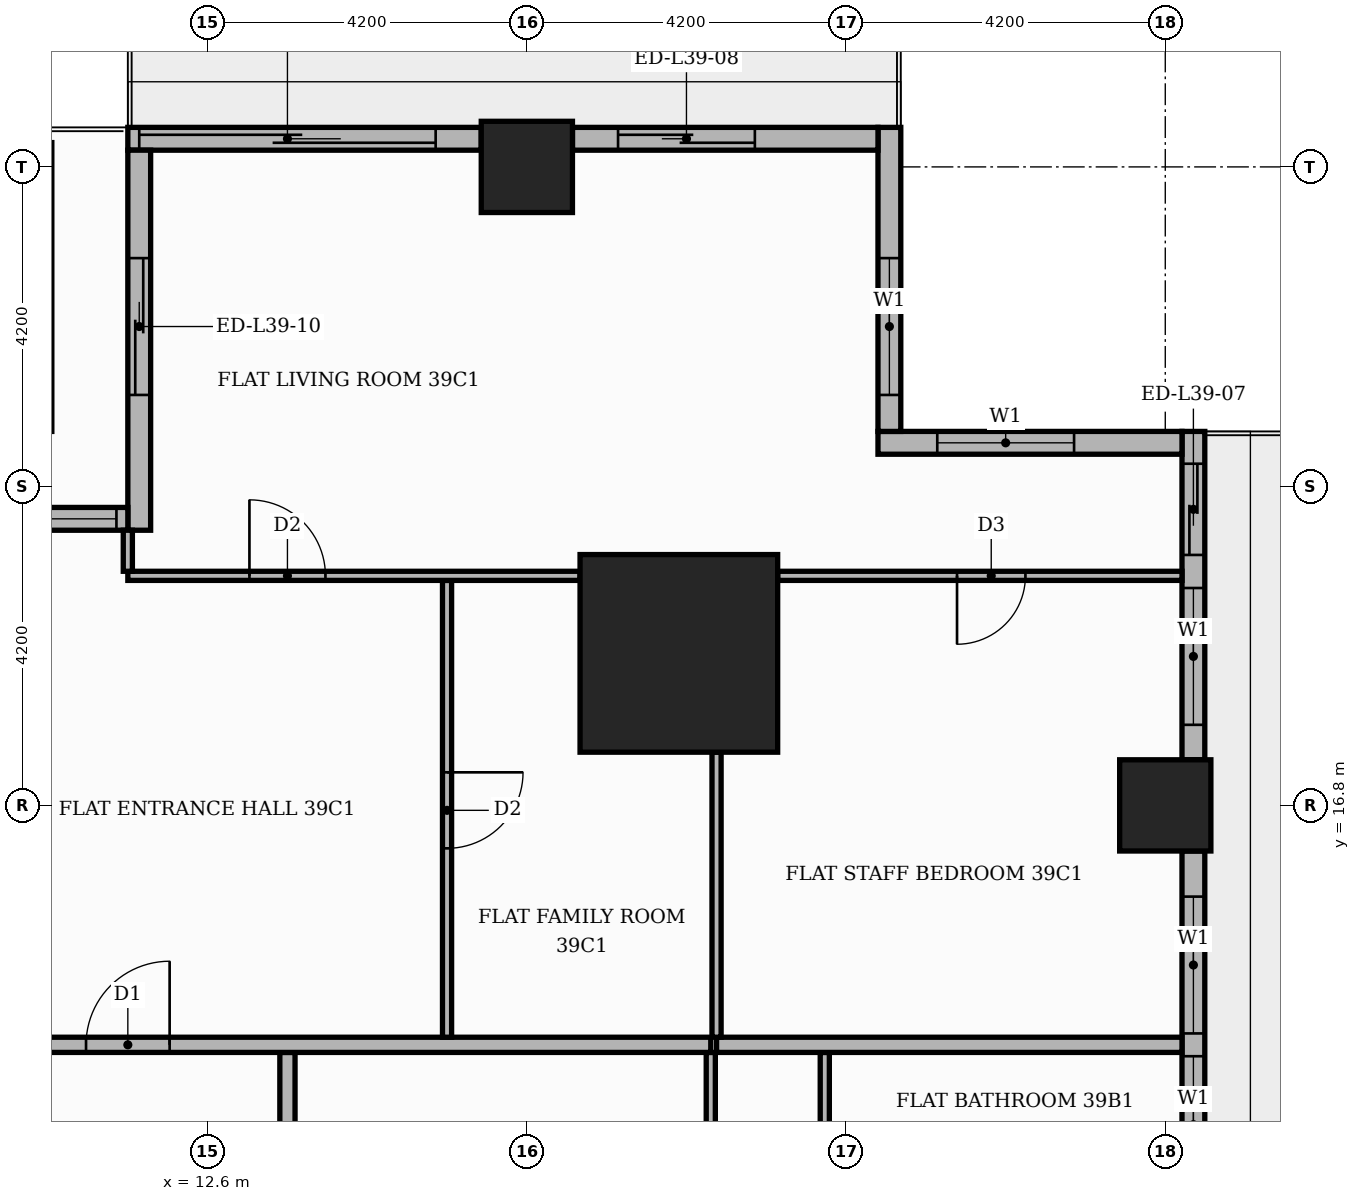
"""IFC4 building model, lengths in metres.
Left out: names, types, materials, properties, quantities, classifications, styles, units other than length and angle.
Written with IfcOpenShell. Run it as: python <this file> out.ifc"""

import sys

from ifc_helpers import new_model, si_unit, direction, frame, frame_2d, origin, origin_2d, place, context, subcontext, project, spatial, rectangle, extrude, element, fill, save


model = new_model("IFC4")
c1 = context("Model", 3, precision=1e-05, world=origin(), true_north=direction((0.0, 1.0)))
c2 = subcontext(c1, "Body", "Model", "MODEL_VIEW")
j1 = project(units=[si_unit("LENGTHUNIT", "METRE"), si_unit("PLANEANGLEUNIT", "RADIAN")], contexts=[c1])
p1 = place(None, origin())
s1 = spatial("IfcSite", under=j1, at=p1, CompositionType="ELEMENT")
p2 = place(p1, origin())
s2 = spatial("IfcBuilding", under=s1, at=p2, CompositionType="ELEMENT")
p3 = place(p2, frame((0.0, 0.0, 165.0)))
s3 = spatial("IfcBuildingStorey", under=s2, at=p3, CompositionType="ELEMENT", Elevation=165.0)
p4 = place(p3, frame((18.8, 18.8, 0.0), z_axis=(0.0, 0.0, 1.0), x_axis=(1.0, 0.0, 0.0)))
e1 = element("IfcColumn", 1, at=p4, inside=s3, PredefinedType="COLUMN", context=c2, shape_type="SweptSolid", body=[
    extrude(rectangle(XDim=2.6, YDim=2.6, at=origin_2d()), origin(), (0.0, 0.0, 1.0), 3.9),
])
for number, where, z_axis, x_axis in (
    (2, (25.2, 16.8, 0.0), (0.0, 0.0, 1.0), (1.0, 0.0, 0.0)),
    (3, (16.8, 25.2, 0.0), (0.0, 0.0, 1.0), (1.0, 0.0, 0.0)),
):
    element("IfcColumn", number, at=place(p3, frame(where, z_axis=z_axis, x_axis=x_axis)), inside=s3, PredefinedType="COLUMN", context=c2, shape_type="SweptSolid", body=[
        extrude(rectangle(XDim=1.2, YDim=1.2, at=origin_2d()), origin(), (0.0, 0.0, 1.0), 3.9),
    ])
p5 = place(p3, frame((25.57, 9.0, 0.0), z_axis=(0.0, 0.0, 1.0), x_axis=(0.0, 1.0, 0.0)))
e4 = element("IfcWall", 4, at=p5, inside=s3, PredefinedType="STANDARD", context=c2, shape_type="SweptSolid", body=[
    extrude(rectangle(XDim=7.2, YDim=0.3, at=frame_2d((3.6, 0.0))), origin(), (0.0, 0.0, 1.0), 3.48),
])
p6 = place(p5, frame((0.6, 0.0, 0.9)))
e5 = element("IfcOpeningElement", 5, at=p6, cuts=e4, PredefinedType="OPENING", context=c2, shape_type="SweptSolid", body=[
    extrude(rectangle(XDim=1.8, YDim=2.1, at=frame_2d((0.9, 1.05))), frame((0.0, 0.16, 0.0), z_axis=(0.0, -1.0, 0.0), x_axis=(1.0, 0.0, 0.0)), (0.0, 0.0, 1.0), 0.32),
])
p7 = place(p5, frame((2.7, 0.0, 0.9)))
e6 = element("IfcOpeningElement", 6, at=p7, cuts=e4, PredefinedType="OPENING", context=c2, shape_type="SweptSolid", body=[
    extrude(rectangle(XDim=1.8, YDim=2.1, at=frame_2d((0.9, 1.05))), frame((0.0, 0.16, 0.0), z_axis=(0.0, -1.0, 0.0), x_axis=(1.0, 0.0, 0.0)), (0.0, 0.0, 1.0), 0.32),
])
p8 = place(p5, frame((4.8, 0.0, 0.9)))
e7 = element("IfcOpeningElement", 7, at=p8, cuts=e4, PredefinedType="OPENING", context=c2, shape_type="SweptSolid", body=[
    extrude(rectangle(XDim=1.8, YDim=2.1, at=frame_2d((0.9, 1.05))), frame((0.0, 0.16, 0.0), z_axis=(0.0, -1.0, 0.0), x_axis=(1.0, 0.0, 0.0)), (0.0, 0.0, 1.0), 0.32),
])
p9 = place(p3, frame((25.57, 17.4, 0.0), z_axis=(0.0, 0.0, 1.0), x_axis=(0.0, 1.0, 0.0)))
e8 = element("IfcWall", 8, at=p9, inside=s3, PredefinedType="STANDARD", context=c2, shape_type="SweptSolid", body=[
    extrude(rectangle(XDim=4.32, YDim=0.3, at=frame_2d((2.16, 0.0))), origin(), (0.0, 0.0, 1.0), 3.48),
])
p10 = place(p9, frame((2.695, 0.0, 0.0)))
e9 = element("IfcOpeningElement", 9, at=p10, cuts=e8, PredefinedType="OPENING", context=c2, shape_type="SweptSolid", body=[
    extrude(rectangle(XDim=1.2, YDim=2.4, at=frame_2d((0.6, 1.2))), frame((0.0, 0.16, 0.0), z_axis=(0.0, -1.0, 0.0), x_axis=(1.0, 0.0, 0.0)), (0.0, 0.0, 1.0), 0.32),
])
p11 = place(p9, frame((0.46, 0.0, 0.9)))
e10 = element("IfcOpeningElement", 10, at=p11, cuts=e8, PredefinedType="OPENING", context=c2, shape_type="SweptSolid", body=[
    extrude(rectangle(XDim=1.8, YDim=2.1, at=frame_2d((0.9, 1.05))), frame((0.0, 0.16, 0.0), z_axis=(0.0, -1.0, 0.0), x_axis=(1.0, 0.0, 0.0)), (0.0, 0.0, 1.0), 0.32),
])
p12 = place(p3, frame((25.42, 21.57, 0.0), z_axis=(0.0, 0.0, 1.0), x_axis=(-1.0, 0.0, 0.0)))
e11 = element("IfcWall", 11, at=p12, inside=s3, PredefinedType="STANDARD", context=c2, shape_type="SweptSolid", body=[
    extrude(rectangle(XDim=4.0, YDim=0.3, at=frame_2d((2.0, 0.0))), origin(), (0.0, 0.0, 1.0), 3.48),
])
p13 = place(p12, frame((1.42, 0.0, 0.9)))
e12 = element("IfcOpeningElement", 12, at=p13, cuts=e11, PredefinedType="OPENING", context=c2, shape_type="SweptSolid", body=[
    extrude(rectangle(XDim=1.8, YDim=2.1, at=frame_2d((0.9, 1.05))), frame((0.0, 0.16, 0.0), z_axis=(0.0, -1.0, 0.0), x_axis=(1.0, 0.0, 0.0)), (0.0, 0.0, 1.0), 0.32),
])
p14 = place(p3, frame((21.57, 21.72, 0.0), z_axis=(0.0, 0.0, 1.0), x_axis=(0.0, 1.0, 0.0)))
e13 = element("IfcWall", 13, at=p14, inside=s3, PredefinedType="STANDARD", context=c2, shape_type="SweptSolid", body=[
    extrude(rectangle(XDim=4.0, YDim=0.3, at=frame_2d((2.0, 0.0))), origin(), (0.0, 0.0, 1.0), 3.48),
])
p15 = place(p14, frame((0.48, 0.0, 0.9)))
e14 = element("IfcOpeningElement", 14, at=p15, cuts=e13, PredefinedType="OPENING", context=c2, shape_type="SweptSolid", body=[
    extrude(rectangle(XDim=1.8, YDim=2.1, at=frame_2d((0.9, 1.05))), frame((0.0, 0.16, 0.0), z_axis=(0.0, -1.0, 0.0), x_axis=(1.0, 0.0, 0.0)), (0.0, 0.0, 1.0), 0.32),
])
p16 = place(p3, frame((21.42, 25.57, 0.0), z_axis=(0.0, 0.0, 1.0), x_axis=(-1.0, 0.0, 0.0)))
e15 = element("IfcWall", 15, at=p16, inside=s3, PredefinedType="STANDARD", context=c2, shape_type="SweptSolid", body=[
    extrude(rectangle(XDim=4.02, YDim=0.3, at=frame_2d((2.01, 0.0))), origin(), (0.0, 0.0, 1.0), 3.48),
])
p17 = place(p16, frame((1.62, 0.0, 0.0)))
e16 = element("IfcOpeningElement", 16, at=p17, cuts=e15, PredefinedType="OPENING", context=c2, shape_type="SweptSolid", body=[
    extrude(rectangle(XDim=1.8, YDim=2.4, at=frame_2d((0.9, 1.2))), frame((0.0, 0.16, 0.0), z_axis=(0.0, -1.0, 0.0), x_axis=(1.0, 0.0, 0.0)), (0.0, 0.0, 1.0), 0.32),
])
p18 = place(p3, frame((16.2, 25.57, 0.0), z_axis=(0.0, 0.0, 1.0), x_axis=(-1.0, 0.0, 0.0)))
e17 = element("IfcWall", 17, at=p18, inside=s3, PredefinedType="STANDARD", context=c2, shape_type="SweptSolid", body=[
    extrude(rectangle(XDim=4.65, YDim=0.3, at=frame_2d((2.325, 0.0))), origin(), (0.0, 0.0, 1.0), 3.48),
])
p19 = place(p18, frame((0.6, 0.0, 0.0)))
e18 = element("IfcOpeningElement", 18, at=p19, cuts=e17, PredefinedType="OPENING", context=c2, shape_type="SweptSolid", body=[
    extrude(rectangle(XDim=3.9, YDim=2.4, at=frame_2d((1.95, 1.2))), frame((0.0, 0.16, 0.0), z_axis=(0.0, -1.0, 0.0), x_axis=(1.0, 0.0, 0.0)), (0.0, 0.0, 1.0), 0.32),
])
p20 = place(p3, frame((11.7, 25.42, 0.0), z_axis=(0.0, 0.0, 1.0), x_axis=(0.0, -1.0, 0.0)))
e19 = element("IfcWall", 19, at=p20, inside=s3, PredefinedType="STANDARD", context=c2, shape_type="SweptSolid", body=[
    extrude(rectangle(XDim=5.0, YDim=0.3, at=frame_2d((2.5, 0.0))), origin(), (0.0, 0.0, 1.0), 3.48),
])
p21 = place(p20, frame((1.42, 0.0, 0.0)))
e20 = element("IfcOpeningElement", 20, at=p21, cuts=e19, PredefinedType="OPENING", context=c2, shape_type="SweptSolid", body=[
    extrude(rectangle(XDim=1.8, YDim=2.4, at=frame_2d((0.9, 1.2))), frame((0.0, 0.16, 0.0), z_axis=(0.0, -1.0, 0.0), x_axis=(1.0, 0.0, 0.0)), (0.0, 0.0, 1.0), 0.32),
])
p22 = place(p3, frame((11.55, 20.57, 0.0), z_axis=(0.0, 0.0, 1.0), x_axis=(-1.0, 0.0, 0.0)))
e21 = element("IfcWall", 21, at=p22, inside=s3, PredefinedType="STANDARD", context=c2, shape_type="SweptSolid", body=[
    extrude(rectangle(XDim=23.4, YDim=0.3, at=frame_2d((11.7, 0.0))), origin(), (0.0, 0.0, 1.0), 3.48),
])
p23 = place(p22, frame((0.15, 0.0, 0.9)))
e22 = element("IfcOpeningElement", 22, at=p23, cuts=e21, PredefinedType="OPENING", context=c2, shape_type="SweptSolid", body=[
    extrude(rectangle(XDim=6.0, YDim=2.1, at=frame_2d((3.0, 1.05))), frame((0.0, 0.16, 0.0), z_axis=(0.0, -1.0, 0.0), x_axis=(1.0, 0.0, 0.0)), (0.0, 0.0, 1.0), 0.32),
])
p24 = place(p22, frame((6.45, 0.0, 0.9)))
e23 = element("IfcOpeningElement", 23, at=p24, cuts=e21, PredefinedType="OPENING", context=c2, shape_type="SweptSolid", body=[
    extrude(rectangle(XDim=6.0, YDim=2.1, at=frame_2d((3.0, 1.05))), frame((0.0, 0.16, 0.0), z_axis=(0.0, -1.0, 0.0), x_axis=(1.0, 0.0, 0.0)), (0.0, 0.0, 1.0), 0.32),
])
p25 = place(p22, frame((12.75, 0.0, 0.9)))
e24 = element("IfcOpeningElement", 24, at=p25, cuts=e21, PredefinedType="OPENING", context=c2, shape_type="SweptSolid", body=[
    extrude(rectangle(XDim=6.0, YDim=2.1, at=frame_2d((3.0, 1.05))), frame((0.0, 0.16, 0.0), z_axis=(0.0, -1.0, 0.0), x_axis=(1.0, 0.0, 0.0)), (0.0, 0.0, 1.0), 0.32),
])
p26 = place(p22, frame((19.05, 0.0, 0.9)))
e25 = element("IfcOpeningElement", 25, at=p26, cuts=e21, PredefinedType="OPENING", context=c2, shape_type="SweptSolid", body=[
    extrude(rectangle(XDim=3.9, YDim=2.1, at=frame_2d((1.95, 1.05))), frame((0.0, 0.16, 0.0), z_axis=(0.0, -1.0, 0.0), x_axis=(1.0, 0.0, 0.0)), (0.0, 0.0, 1.0), 0.32),
])
p27 = place(p3, frame((19.22, 9.21, 0.0), z_axis=(0.0, 0.0, 1.0), x_axis=(0.0, 1.0, 0.0)))
e26 = element("IfcWall", 26, at=p27, inside=s3, PredefinedType="PARTITIONING", context=c2, shape_type="SweptSolid", body=[
    extrude(rectangle(XDim=4.34, YDim=0.12, at=frame_2d((2.17, 0.0))), origin(), (0.0, 0.0, 1.0), 3.48),
])
p28 = place(p27, frame((1.74, 0.0, 0.0)))
e27 = element("IfcOpeningElement", 27, at=p28, cuts=e26, PredefinedType="OPENING", context=c2, shape_type="SweptSolid", body=[
    extrude(rectangle(XDim=0.9, YDim=2.1, at=frame_2d((0.45, 1.05))), frame((0.0, 0.07, 0.0), z_axis=(0.0, -1.0, 0.0), x_axis=(1.0, 0.0, 0.0)), (0.0, 0.0, 1.0), 0.14),
])
p29 = place(p3, frame((13.65, 11.1, 0.0), z_axis=(0.0, 0.0, 1.0), x_axis=(0.0, 1.0, 0.0)))
e28 = element("IfcWall", 28, at=p29, inside=s3, PredefinedType="PARTITIONING", context=c2, shape_type="SweptSolid", body=[
    extrude(rectangle(XDim=2.45, YDim=0.2, at=frame_2d((1.225, 0.0))), origin(), (0.0, 0.0, 1.0), 3.48),
])
p30 = place(p3, frame((20.72, 11.61, 0.0), z_axis=(0.0, 0.0, 1.0), x_axis=(0.0, 1.0, 0.0)))
e29 = element("IfcWall", 29, at=p30, inside=s3, PredefinedType="PARTITIONING", context=c2, shape_type="SweptSolid", body=[
    extrude(rectangle(XDim=1.94, YDim=0.12, at=frame_2d((0.97, 0.0))), origin(), (0.0, 0.0, 1.0), 3.48),
])
p31 = place(p3, frame((-13.65, 13.65, 0.0), z_axis=(0.0, 0.0, 1.0), x_axis=(1.0, 0.0, 0.0)))
e30 = element("IfcWall", 30, at=p31, inside=s3, PredefinedType="PARTITIONING", context=c2, shape_type="SweptSolid", body=[
    extrude(rectangle(XDim=32.87, YDim=0.2, at=frame_2d((16.435, 0.0))), origin(), (0.0, 0.0, 1.0), 3.48),
])
p32 = place(p31, frame((24.65, 0.0, 0.0)))
e31 = element("IfcOpeningElement", 31, at=p32, cuts=e30, PredefinedType="OPENING", context=c2, shape_type="SweptSolid", body=[
    extrude(rectangle(XDim=1.1, YDim=2.4, at=frame_2d((0.55, 1.2))), frame((0.0, 0.11, 0.0), z_axis=(0.0, -1.0, 0.0), x_axis=(1.0, 0.0, 0.0)), (0.0, 0.0, 1.0), 0.22),
])
p33 = place(p31, frame((12.05, 0.0, 0.0)))
e32 = element("IfcOpeningElement", 32, at=p33, cuts=e30, PredefinedType="OPENING", context=c2, shape_type="SweptSolid", body=[
    extrude(rectangle(XDim=1.1, YDim=2.4, at=frame_2d((0.55, 1.2))), frame((0.0, 0.11, 0.0), z_axis=(0.0, -1.0, 0.0), x_axis=(1.0, 0.0, 0.0)), (0.0, 0.0, 1.0), 0.22),
])
p34 = place(p3, frame((19.296, 13.65, 0.0), z_axis=(0.0, 0.0, 1.0), x_axis=(1.0, 0.0, 0.0)))
e33 = element("IfcWall", 33, at=p34, inside=s3, PredefinedType="PARTITIONING", context=c2, shape_type="SweptSolid", body=[
    extrude(rectangle(XDim=6.124, YDim=0.2, at=frame_2d((3.062, 0.0))), origin(), (0.0, 0.0, 1.0), 3.48),
])
p35 = place(p3, frame((15.75, 13.75, 0.0), z_axis=(0.0, 0.0, 1.0), x_axis=(0.0, 1.0, 0.0)))
e34 = element("IfcWall", 34, at=p35, inside=s3, PredefinedType="PARTITIONING", context=c2, shape_type="SweptSolid", body=[
    extrude(rectangle(XDim=6.01, YDim=0.12, at=frame_2d((3.005, 0.0))), origin(), (0.0, 0.0, 1.0), 3.48),
])
p36 = place(p35, frame((2.485, 0.0, 0.0)))
e35 = element("IfcOpeningElement", 35, at=p36, cuts=e34, PredefinedType="OPENING", context=c2, shape_type="SweptSolid", body=[
    extrude(rectangle(XDim=1.0, YDim=2.1, at=frame_2d((0.5, 1.05))), frame((0.0, 0.07, 0.0), z_axis=(0.0, -1.0, 0.0), x_axis=(1.0, 0.0, 0.0)), (0.0, 0.0, 1.0), 0.14),
])
p37 = place(p3, frame((19.296, 13.75, 0.0), z_axis=(0.0, 0.0, 1.0), x_axis=(0.0, 1.0, 0.0)))
e36 = element("IfcWall", 36, at=p37, inside=s3, PredefinedType="PARTITIONING", context=c2, shape_type="SweptSolid", body=[
    extrude(rectangle(XDim=3.75, YDim=0.12, at=frame_2d((1.875, 0.0))), origin(), (0.0, 0.0, 1.0), 3.48),
])
p38 = place(p3, frame((11.55, 19.82, 0.0), z_axis=(0.0, 0.0, 1.0), x_axis=(1.0, 0.0, 0.0)))
e37 = element("IfcWall", 37, at=p38, inside=s3, PredefinedType="PARTITIONING", context=c2, shape_type="SweptSolid", body=[
    extrude(rectangle(XDim=5.95, YDim=0.12, at=frame_2d((2.975, 0.0))), origin(), (0.0, 0.0, 1.0), 3.48),
])
p39 = place(p38, frame((1.6, 0.0, 0.0)))
e38 = element("IfcOpeningElement", 38, at=p39, cuts=e37, PredefinedType="OPENING", context=c2, shape_type="SweptSolid", body=[
    extrude(rectangle(XDim=1.0, YDim=2.1, at=frame_2d((0.5, 1.05))), frame((0.0, 0.07, 0.0), z_axis=(0.0, -1.0, 0.0), x_axis=(1.0, 0.0, 0.0)), (0.0, 0.0, 1.0), 0.14),
])
p40 = place(p3, frame((20.1, 19.82, 0.0), z_axis=(0.0, 0.0, 1.0), x_axis=(1.0, 0.0, 0.0)))
e39 = element("IfcWall", 39, at=p40, inside=s3, PredefinedType="PARTITIONING", context=c2, shape_type="SweptSolid", body=[
    extrude(rectangle(XDim=5.32, YDim=0.12, at=frame_2d((2.66, 0.0))), origin(), (0.0, 0.0, 1.0), 3.48),
])
p41 = place(p40, frame((2.36, 0.0, 0.0)))
e40 = element("IfcOpeningElement", 40, at=p41, cuts=e39, PredefinedType="OPENING", context=c2, shape_type="SweptSolid", body=[
    extrude(rectangle(XDim=0.9, YDim=2.1, at=frame_2d((0.45, 1.05))), frame((0.0, 0.07, 0.0), z_axis=(0.0, -1.0, 0.0), x_axis=(1.0, 0.0, 0.0)), (0.0, 0.0, 1.0), 0.14),
])
p42 = place(p3, frame((11.55, 19.88, 0.0), z_axis=(0.0, 0.0, 1.0), x_axis=(0.0, 1.0, 0.0)))
e41 = element("IfcWall", 41, at=p42, inside=s3, PredefinedType="PARTITIONING", context=c2, shape_type="SweptSolid", body=[
    extrude(rectangle(XDim=0.54, YDim=0.12, at=frame_2d((0.27, 0.0))), origin(), (0.0, 0.0, 1.0), 3.48),
])
p43 = place(p7, origin())
e42 = element("IfcWindow", 42, at=p43, inside=s3, PartitioningType="SINGLE_PANEL", PredefinedType="WINDOW", context=c2, shape_type="SweptSolid", body=[
    extrude(rectangle(XDim=1.8, YDim=2.1, at=frame_2d((0.9, 1.05))), frame((0.0, 0.03, 0.0), z_axis=(0.0, -1.0, 0.0), x_axis=(1.0, 0.0, 0.0)), (0.0, 0.0, 1.0), 0.06),
])
fill(e6, e42)
p44 = place(p8, origin())
e43 = element("IfcWindow", 43, at=p44, inside=s3, PartitioningType="SINGLE_PANEL", PredefinedType="WINDOW", context=c2, shape_type="SweptSolid", body=[
    extrude(rectangle(XDim=1.8, YDim=2.1, at=frame_2d((0.9, 1.05))), frame((0.0, 0.03, 0.0), z_axis=(0.0, -1.0, 0.0), x_axis=(1.0, 0.0, 0.0)), (0.0, 0.0, 1.0), 0.06),
])
fill(e7, e43)
p45 = place(p10, origin())
e44 = element("IfcDoor", 44, at=p45, inside=s3, OperationType="SLIDING_TO_LEFT", PredefinedType="DOOR", context=c2, shape_type="SweptSolid", body=[
    extrude(rectangle(XDim=1.2, YDim=2.4, at=frame_2d((0.6, 1.2))), frame((0.0, 0.025, 0.0), z_axis=(0.0, -1.0, 0.0), x_axis=(1.0, 0.0, 0.0)), (0.0, 0.0, 1.0), 0.05),
])
fill(e9, e44)
p46 = place(p11, origin())
e45 = element("IfcWindow", 45, at=p46, inside=s3, PartitioningType="SINGLE_PANEL", PredefinedType="WINDOW", context=c2, shape_type="SweptSolid", body=[
    extrude(rectangle(XDim=1.8, YDim=2.1, at=frame_2d((0.9, 1.05))), frame((0.0, 0.03, 0.0), z_axis=(0.0, -1.0, 0.0), x_axis=(1.0, 0.0, 0.0)), (0.0, 0.0, 1.0), 0.06),
])
fill(e10, e45)
p47 = place(p13, origin())
e46 = element("IfcWindow", 46, at=p47, inside=s3, PartitioningType="SINGLE_PANEL", PredefinedType="WINDOW", context=c2, shape_type="SweptSolid", body=[
    extrude(rectangle(XDim=1.8, YDim=2.1, at=frame_2d((0.9, 1.05))), frame((0.0, 0.03, 0.0), z_axis=(0.0, -1.0, 0.0), x_axis=(1.0, 0.0, 0.0)), (0.0, 0.0, 1.0), 0.06),
])
fill(e12, e46)
p48 = place(p15, origin())
e47 = element("IfcWindow", 47, at=p48, inside=s3, PartitioningType="SINGLE_PANEL", PredefinedType="WINDOW", context=c2, shape_type="SweptSolid", body=[
    extrude(rectangle(XDim=1.8, YDim=2.1, at=frame_2d((0.9, 1.05))), frame((0.0, 0.03, 0.0), z_axis=(0.0, -1.0, 0.0), x_axis=(1.0, 0.0, 0.0)), (0.0, 0.0, 1.0), 0.06),
])
fill(e14, e47)
p49 = place(p17, origin())
e48 = element("IfcDoor", 48, at=p49, inside=s3, OperationType="SLIDING_TO_RIGHT", PredefinedType="DOOR", context=c2, shape_type="SweptSolid", body=[
    extrude(rectangle(XDim=1.8, YDim=2.4, at=frame_2d((0.9, 1.2))), frame((0.0, 0.025, 0.0), z_axis=(0.0, -1.0, 0.0), x_axis=(1.0, 0.0, 0.0)), (0.0, 0.0, 1.0), 0.05),
])
fill(e16, e48)
p50 = place(p19, origin())
e49 = element("IfcDoor", 49, at=p50, inside=s3, OperationType="SLIDING_TO_LEFT", PredefinedType="DOOR", context=c2, shape_type="SweptSolid", body=[
    extrude(rectangle(XDim=3.9, YDim=2.4, at=frame_2d((1.95, 1.2))), frame((0.0, 0.025, 0.0), z_axis=(0.0, -1.0, 0.0), x_axis=(1.0, 0.0, 0.0)), (0.0, 0.0, 1.0), 0.05),
])
fill(e18, e49)
p51 = place(p21, origin())
e50 = element("IfcDoor", 50, at=p51, inside=s3, OperationType="SLIDING_TO_LEFT", PredefinedType="DOOR", context=c2, shape_type="SweptSolid", body=[
    extrude(rectangle(XDim=1.8, YDim=2.4, at=frame_2d((0.9, 1.2))), frame((0.0, 0.025, 0.0), z_axis=(0.0, -1.0, 0.0), x_axis=(1.0, 0.0, 0.0)), (0.0, 0.0, 1.0), 0.05),
])
fill(e20, e50)
p52 = place(p23, origin())
e51 = element("IfcWindow", 51, at=p52, inside=s3, PartitioningType="SINGLE_PANEL", PredefinedType="WINDOW", context=c2, shape_type="SweptSolid", body=[
    extrude(rectangle(XDim=6.0, YDim=2.1, at=frame_2d((3.0, 1.05))), frame((0.0, 0.03, 0.0), z_axis=(0.0, -1.0, 0.0), x_axis=(1.0, 0.0, 0.0)), (0.0, 0.0, 1.0), 0.06),
])
fill(e22, e51)
p53 = place(p32, origin())
e52 = element("IfcDoor", 52, at=p53, inside=s3, OperationType="SINGLE_SWING_RIGHT", PredefinedType="DOOR", context=c2, shape_type="SweptSolid", body=[
    extrude(rectangle(XDim=1.1, YDim=2.4, at=frame_2d((0.55, 1.2))), frame((0.0, 0.025, 0.0), z_axis=(0.0, -1.0, 0.0), x_axis=(1.0, 0.0, 0.0)), (0.0, 0.0, 1.0), 0.05),
])
fill(e31, e52)
p54 = place(p41, frame((0.9, 0.0, 0.0), z_axis=(0.0, 0.0, 1.0), x_axis=(-1.0, 0.0, 0.0)))
e53 = element("IfcDoor", 53, at=p54, inside=s3, OperationType="SINGLE_SWING_LEFT", PredefinedType="DOOR", context=c2, shape_type="SweptSolid", body=[
    extrude(rectangle(XDim=0.9, YDim=2.1, at=frame_2d((0.45, 1.05))), frame((0.0, 0.025, 0.0), z_axis=(0.0, -1.0, 0.0), x_axis=(1.0, 0.0, 0.0)), (0.0, 0.0, 1.0), 0.05),
])
fill(e40, e53)
p55 = place(p36, frame((1.0, 0.0, 0.0), z_axis=(0.0, 0.0, 1.0), x_axis=(-1.0, 0.0, 0.0)))
e54 = element("IfcDoor", 54, at=p55, inside=s3, OperationType="SINGLE_SWING_RIGHT", PredefinedType="DOOR", context=c2, shape_type="SweptSolid", body=[
    extrude(rectangle(XDim=1.0, YDim=2.1, at=frame_2d((0.5, 1.05))), frame((0.0, 0.025, 0.0), z_axis=(0.0, -1.0, 0.0), x_axis=(1.0, 0.0, 0.0)), (0.0, 0.0, 1.0), 0.05),
])
fill(e35, e54)
p56 = place(p39, origin())
e55 = element("IfcDoor", 55, at=p56, inside=s3, OperationType="SINGLE_SWING_LEFT", PredefinedType="DOOR", context=c2, shape_type="SweptSolid", body=[
    extrude(rectangle(XDim=1.0, YDim=2.1, at=frame_2d((0.5, 1.05))), frame((0.0, 0.025, 0.0), z_axis=(0.0, -1.0, 0.0), x_axis=(1.0, 0.0, 0.0)), (0.0, 0.0, 1.0), 0.05),
])
fill(e38, e55)
save(model, sys.argv[1])
